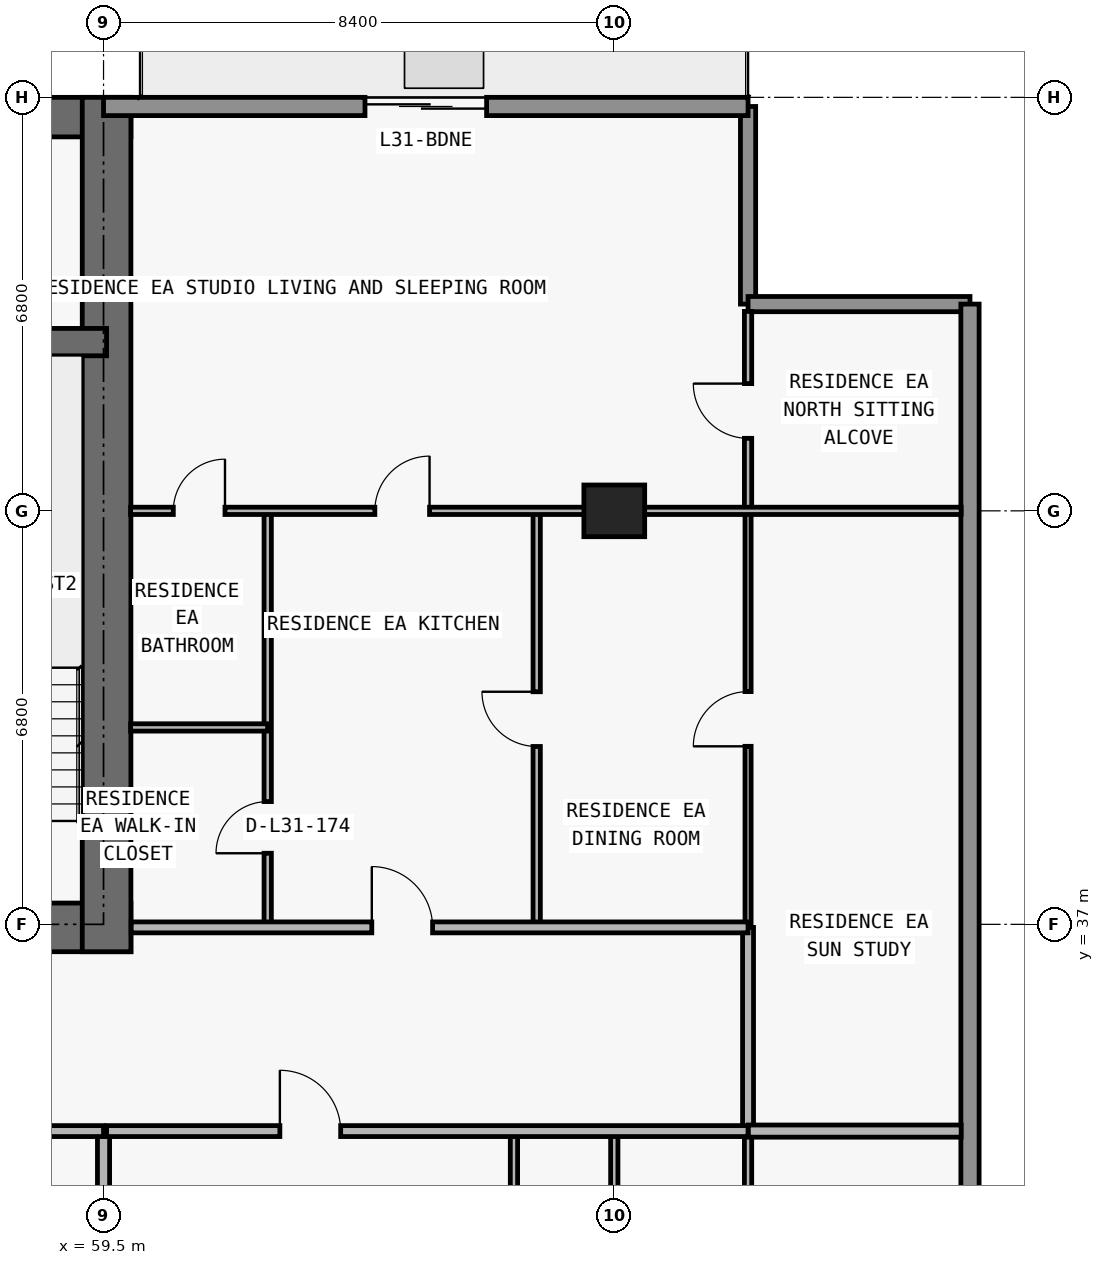
"""IFC4 building model, lengths in metres.
Left out: names, types, materials, properties, quantities, classifications, styles, units other than length and angle.
Written with IfcOpenShell. Run it as: python <this file> out.ifc"""

import sys

from ifc_helpers import new_model, si_unit, direction, frame, frame_2d, origin, origin_2d, place, context, subcontext, project, spatial, rectangle, extrude, element, fill, save


model = new_model("IFC4")
c1 = context("Model", 3, precision=1e-05, world=origin(), true_north=direction((0.0, 1.0)))
c2 = subcontext(c1, "Body", "Model", "MODEL_VIEW")
j1 = project(units=[si_unit("LENGTHUNIT", "METRE"), si_unit("PLANEANGLEUNIT", "RADIAN")], contexts=[c1])
p1 = place(None, origin())
s1 = spatial("IfcSite", under=j1, at=p1, CompositionType="ELEMENT")
p2 = place(p1, origin())
s2 = spatial("IfcBuilding", under=s1, at=p2, CompositionType="ELEMENT")
p3 = place(p2, frame((0.0, 0.0, 115.8)))
s3 = spatial("IfcBuildingStorey", under=s2, at=p3, CompositionType="ELEMENT", Elevation=115.8)
p4 = place(p3, frame((67.9, 43.8, 0.0), z_axis=(0.0, 0.0, 1.0), x_axis=(1.0, 0.0, 0.0)))
e1 = element("IfcColumn", 1, at=p4, inside=s3, PredefinedType="COLUMN", context=c2, shape_type="SweptSolid", body=[
    extrude(rectangle(XDim=1.0, YDim=0.85, at=origin_2d()), origin(), (0.0, 0.0, 1.0), 3.05),
])
p5 = place(p3, frame((17.85, 36.95, 0.0), z_axis=(0.0, 0.0, 1.0), x_axis=(1.0, 0.0, 0.0)))
e2 = element("IfcWall", 2, at=p5, inside=s3, PredefinedType="SHEAR", context=c2, shape_type="SweptSolid", body=[
    extrude(rectangle(XDim=42.1, YDim=0.8, at=frame_2d((21.05, 0.0))), origin(), (0.0, 0.0, 1.0), 3.05),
])
p6 = place(p5, frame((14.45, 0.0, 0.0)))
e3 = element("IfcOpeningElement", 3, at=p6, cuts=e2, PredefinedType="OPENING", context=c2, shape_type="SweptSolid", body=[
    extrude(rectangle(XDim=1.1, YDim=2.15, at=frame_2d((0.55, 1.075))), frame((0.0, 0.41, 0.0), z_axis=(0.0, -1.0, 0.0), x_axis=(1.0, 0.0, 0.0)), (0.0, 0.0, 1.0), 0.82),
])
p7 = place(p5, frame((6.3, 0.0, 0.0)))
e4 = element("IfcOpeningElement", 4, at=p7, cuts=e2, PredefinedType="OPENING", context=c2, shape_type="SweptSolid", body=[
    extrude(rectangle(XDim=1.05, YDim=2.15, at=frame_2d((0.525, 1.075))), frame((0.0, 0.41, 0.0), z_axis=(0.0, -1.0, 0.0), x_axis=(1.0, 0.0, 0.0)), (0.0, 0.0, 1.0), 0.82),
])
p8 = place(p5, frame((34.8, 0.0, 0.0)))
e5 = element("IfcOpeningElement", 5, at=p8, cuts=e2, PredefinedType="OPENING", context=c2, shape_type="SweptSolid", body=[
    extrude(rectangle(XDim=1.05, YDim=2.15, at=frame_2d((0.525, 1.075))), frame((0.0, 0.41, 0.0), z_axis=(0.0, -1.0, 0.0), x_axis=(1.0, 0.0, 0.0)), (0.0, 0.0, 1.0), 0.82),
])
p9 = place(p5, frame((10.913, 0.0, 0.0)))
e6 = element("IfcOpeningElement", 6, at=p9, cuts=e2, PredefinedType="OPENING", context=c2, shape_type="SweptSolid", body=[
    extrude(rectangle(XDim=1.05, YDim=2.15, at=frame_2d((0.525, 1.075))), frame((0.0, 0.41, 0.0), z_axis=(0.0, -1.0, 0.0), x_axis=(1.0, 0.0, 0.0)), (0.0, 0.0, 1.0), 0.82),
])
p10 = place(p5, frame((24.15, 0.0, 0.0)))
e7 = element("IfcOpeningElement", 7, at=p10, cuts=e2, PredefinedType="OPENING", context=c2, shape_type="SweptSolid", body=[
    extrude(rectangle(XDim=1.05, YDim=2.15, at=frame_2d((0.525, 1.075))), frame((0.0, 0.41, 0.0), z_axis=(0.0, -1.0, 0.0), x_axis=(1.0, 0.0, 0.0)), (0.0, 0.0, 1.0), 0.82),
])
p11 = place(p3, frame((17.85, 50.275, 0.0), z_axis=(0.0, 0.0, 1.0), x_axis=(1.0, 0.0, 0.0)))
e8 = element("IfcWall", 8, at=p11, inside=s3, PredefinedType="SHEAR", context=c2, shape_type="SweptSolid", body=[
    extrude(rectangle(XDim=42.1, YDim=0.65, at=frame_2d((21.05, 0.0))), origin(), (0.0, 0.0, 1.0), 3.05),
])
p12 = place(p3, frame((59.55, 36.55, 0.0), z_axis=(0.0, 0.0, 1.0), x_axis=(0.0, 1.0, 0.0)))
e9 = element("IfcWall", 9, at=p12, inside=s3, PredefinedType="SHEAR", context=c2, shape_type="SweptSolid", body=[
    extrude(rectangle(XDim=14.05, YDim=0.8, at=frame_2d((7.025, 0.0))), origin(), (0.0, 0.0, 1.0), 3.05),
])
p13 = place(p3, frame((18.25, 46.575, 0.0), z_axis=(0.0, 0.0, 1.0), x_axis=(1.0, 0.0, 0.0)))
e10 = element("IfcWall", 10, at=p13, inside=s3, PredefinedType="SHEAR", context=c2, shape_type="SweptSolid", body=[
    extrude(rectangle(XDim=41.3, YDim=0.45, at=frame_2d((20.65, 0.0))), origin(), (0.0, 0.0, 1.0), 3.05),
])
p14 = place(p13, frame((7.625, 0.0, 0.0)))
e11 = element("IfcOpeningElement", 11, at=p14, cuts=e10, PredefinedType="OPENING", context=c2, shape_type="SweptSolid", body=[
    extrude(rectangle(XDim=1.05, YDim=2.15, at=frame_2d((0.525, 1.075))), frame((0.0, 0.235, 0.0), z_axis=(0.0, -1.0, 0.0), x_axis=(1.0, 0.0, 0.0)), (0.0, 0.0, 1.0), 0.47),
])
p15 = place(p13, frame((32.675, 0.0, 0.0)))
e12 = element("IfcOpeningElement", 12, at=p15, cuts=e10, PredefinedType="OPENING", context=c2, shape_type="SweptSolid", body=[
    extrude(rectangle(XDim=1.05, YDim=2.15, at=frame_2d((0.525, 1.075))), frame((0.0, 0.235, 0.0), z_axis=(0.0, -1.0, 0.0), x_axis=(1.0, 0.0, 0.0)), (0.0, 0.0, 1.0), 0.47),
])
p16 = place(p3, frame((70.1, 50.45, 0.0), z_axis=(0.0, 0.0, 1.0), x_axis=(0.0, -1.0, 0.0)))
e13 = element("IfcWall", 13, at=p16, inside=s3, PredefinedType="ELEMENTEDWALL", context=c2, shape_type="SweptSolid", body=[
    extrude(rectangle(XDim=3.25, YDim=0.25, at=frame_2d((1.625, 0.0))), origin(), (0.0, 0.0, 1.0), 3.05),
])
p17 = place(p3, frame((70.1, 47.2, 0.0), z_axis=(0.0, 0.0, 1.0), x_axis=(1.0, 0.0, 0.0)))
e14 = element("IfcWall", 14, at=p17, inside=s3, PredefinedType="ELEMENTEDWALL", context=c2, shape_type="SweptSolid", body=[
    extrude(rectangle(XDim=3.65, YDim=0.25, at=frame_2d((1.825, 0.0))), origin(), (0.0, 0.0, 1.0), 3.05),
])
p18 = place(p3, frame((73.75, 47.2, 0.0), z_axis=(0.0, 0.0, 1.0), x_axis=(0.0, -1.0, 0.0)))
e15 = element("IfcWall", 15, at=p18, inside=s3, PredefinedType="STANDARD", context=c2, shape_type="SweptSolid", body=[
    extrude(rectangle(XDim=19.2, YDim=0.3, at=frame_2d((9.6, 0.0))), origin(), (0.0, 0.0, 1.0), 3.05),
])
p19 = place(p3, frame((59.5, 50.45, 0.0), z_axis=(0.0, 0.0, 1.0), x_axis=(1.0, 0.0, 0.0)))
e16 = element("IfcWall", 16, at=p19, inside=s3, PredefinedType="STANDARD", context=c2, shape_type="SweptSolid", body=[
    extrude(rectangle(XDim=10.6, YDim=0.3, at=frame_2d((5.3, 0.0))), origin(), (0.0, 0.0, 1.0), 3.05),
])
p20 = place(p19, frame((4.3, 0.0, 0.0)))
e17 = element("IfcOpeningElement", 17, at=p20, cuts=e16, PredefinedType="OPENING", context=c2, shape_type="SweptSolid", body=[
    extrude(rectangle(XDim=2.0, YDim=2.3, at=frame_2d((1.0, 1.15))), frame((0.0, 0.16, 0.0), z_axis=(0.0, -1.0, 0.0), x_axis=(1.0, 0.0, 0.0)), (0.0, 0.0, 1.0), 0.32),
])
p21 = place(p3, frame((59.5, 27.08, 0.0), z_axis=(0.0, 0.0, 1.0), x_axis=(0.0, 1.0, 0.0)))
e18 = element("IfcWall", 18, at=p21, inside=s3, PredefinedType="PARTITIONING", context=c2, shape_type="SweptSolid", body=[
    extrude(rectangle(XDim=6.52, YDim=0.2, at=frame_2d((3.26, 0.0))), origin(), (0.0, 0.0, 1.0), 2.174),
])
p22 = place(p3, frame((62.2, 36.95, 0.0), z_axis=(0.0, 0.0, 1.0), x_axis=(0.0, 1.0, 0.0)))
e19 = element("IfcWall", 19, at=p22, inside=s3, PredefinedType="PARTITIONING", context=c2, shape_type="SweptSolid", body=[
    extrude(rectangle(XDim=6.85, YDim=0.12, at=frame_2d((3.425, 0.0))), origin(), (0.0, 0.0, 1.0), 3.05),
])
p23 = place(p22, frame((1.219, 0.0, 0.0)))
e20 = element("IfcOpeningElement", 20, at=p23, cuts=e19, PredefinedType="OPENING", context=c2, shape_type="SweptSolid", body=[
    extrude(rectangle(XDim=0.85, YDim=2.1, at=frame_2d((0.425, 1.05))), frame((0.0, 0.07, 0.0), z_axis=(0.0, -1.0, 0.0), x_axis=(1.0, 0.0, 0.0)), (0.0, 0.0, 1.0), 0.14),
])
p24 = place(p3, frame((66.25, 27.08, 0.0), z_axis=(0.0, 0.0, 1.0), x_axis=(0.0, 1.0, 0.0)))
e21 = element("IfcWall", 21, at=p24, inside=s3, PredefinedType="PARTITIONING", context=c2, shape_type="SweptSolid", body=[
    extrude(rectangle(XDim=6.52, YDim=0.12, at=frame_2d((3.26, 0.0))), origin(), (0.0, 0.0, 1.0), 3.05),
])
p25 = place(p24, frame((3.285, 0.0, 0.0)))
e22 = element("IfcOpeningElement", 22, at=p25, cuts=e21, PredefinedType="OPENING", context=c2, shape_type="SweptSolid", body=[
    extrude(rectangle(XDim=0.85, YDim=2.1, at=frame_2d((0.425, 1.05))), frame((0.0, 0.07, 0.0), z_axis=(0.0, -1.0, 0.0), x_axis=(1.0, 0.0, 0.0)), (0.0, 0.0, 1.0), 0.14),
])
p26 = place(p3, frame((66.624, 36.95, 0.0), z_axis=(0.0, 0.0, 1.0), x_axis=(0.0, 1.0, 0.0)))
e23 = element("IfcWall", 23, at=p26, inside=s3, PredefinedType="PARTITIONING", context=c2, shape_type="SweptSolid", body=[
    extrude(rectangle(XDim=6.85, YDim=0.12, at=frame_2d((3.425, 0.0))), origin(), (0.0, 0.0, 1.0), 3.05),
])
p27 = place(p26, frame((2.975, 0.0, 0.0)))
e24 = element("IfcOpeningElement", 24, at=p27, cuts=e23, PredefinedType="OPENING", context=c2, shape_type="SweptSolid", body=[
    extrude(rectangle(XDim=0.9, YDim=2.15, at=frame_2d((0.45, 1.075))), frame((0.0, 0.07, 0.0), z_axis=(0.0, -1.0, 0.0), x_axis=(1.0, 0.0, 0.0)), (0.0, 0.0, 1.0), 0.14),
])
p28 = place(p3, frame((67.9, 27.08, 0.0), z_axis=(0.0, 0.0, 1.0), x_axis=(0.0, 1.0, 0.0)))
e25 = element("IfcWall", 25, at=p28, inside=s3, PredefinedType="PARTITIONING", context=c2, shape_type="SweptSolid", body=[
    extrude(rectangle(XDim=6.52, YDim=0.12, at=frame_2d((3.26, 0.0))), origin(), (0.0, 0.0, 1.0), 2.174),
])
p29 = place(p3, frame((70.1, 27.08, 0.0), z_axis=(0.0, 0.0, 1.0), x_axis=(0.0, 1.0, 0.0)))
e26 = element("IfcWall", 26, at=p29, inside=s3, PredefinedType="PARTITIONING", context=c2, shape_type="SweptSolid", body=[
    extrude(rectangle(XDim=6.52, YDim=0.12, at=frame_2d((3.26, 0.0))), origin(), (0.0, 0.0, 1.0), 3.05),
])
p30 = place(p3, frame((70.1, 33.605, 0.0), z_axis=(0.0, 0.0, 1.0), x_axis=(0.0, 1.0, 0.0)))
e27 = element("IfcWall", 27, at=p30, inside=s3, PredefinedType="PARTITIONING", context=c2, shape_type="SweptSolid", body=[
    extrude(rectangle(XDim=3.345, YDim=0.18, at=frame_2d((1.672, 0.0))), origin(), (0.0, 0.0, 1.0), 3.05),
])
p31 = place(p3, frame((70.1, 36.955, 0.0), z_axis=(0.0, 0.0, 1.0), x_axis=(0.0, 1.0, 0.0)))
e28 = element("IfcWall", 28, at=p31, inside=s3, PredefinedType="MOVABLE", context=c2, shape_type="SweptSolid", body=[
    extrude(rectangle(XDim=6.845, YDim=0.1, at=frame_2d((3.422, 0.0))), origin(), (0.0, 0.0, 1.0), 3.05),
])
p32 = place(p31, frame((2.972, 0.0, 0.0)))
e29 = element("IfcOpeningElement", 29, at=p32, cuts=e28, PredefinedType="OPENING", context=c2, shape_type="SweptSolid", body=[
    extrude(rectangle(XDim=0.9, YDim=2.15, at=frame_2d((0.45, 1.075))), frame((0.0, 0.06, 0.0), z_axis=(0.0, -1.0, 0.0), x_axis=(1.0, 0.0, 0.0)), (0.0, 0.0, 1.0), 0.12),
])
p33 = place(p3, frame((70.1, 43.805, 0.0), z_axis=(0.0, 0.0, 1.0), x_axis=(0.0, 1.0, 0.0)))
e30 = element("IfcWall", 30, at=p33, inside=s3, PredefinedType="PARTITIONING", context=c2, shape_type="SweptSolid", body=[
    extrude(rectangle(XDim=3.275, YDim=0.12, at=frame_2d((1.638, 0.0))), origin(), (0.0, 0.0, 1.0), 3.05),
])
p34 = place(p33, frame((1.188, 0.0, 0.0)))
e31 = element("IfcOpeningElement", 31, at=p34, cuts=e30, PredefinedType="OPENING", context=c2, shape_type="SweptSolid", body=[
    extrude(rectangle(XDim=0.9, YDim=2.15, at=frame_2d((0.45, 1.075))), frame((0.0, 0.07, 0.0), z_axis=(0.0, -1.0, 0.0), x_axis=(1.0, 0.0, 0.0)), (0.0, 0.0, 1.0), 0.14),
])
p35 = place(p3, frame((18.3, 33.6, 0.0), z_axis=(0.0, 0.0, 1.0), x_axis=(1.0, 0.0, 0.0)))
e32 = element("IfcWall", 32, at=p35, inside=s3, PredefinedType="PARTITIONING", context=c2, shape_type="SweptSolid", body=[
    extrude(rectangle(XDim=41.2, YDim=0.18, at=frame_2d((20.6, 0.0))), origin(), (0.0, 0.0, 1.0), 3.05),
])
p36 = place(p35, frame((11.35, 0.0, 0.0)))
e33 = element("IfcOpeningElement", 33, at=p36, cuts=e32, PredefinedType="OPENING", context=c2, shape_type="SweptSolid", body=[
    extrude(rectangle(XDim=1.0, YDim=2.2, at=frame_2d((0.5, 1.1))), frame((0.0, 0.1, 0.0), z_axis=(0.0, -1.0, 0.0), x_axis=(1.0, 0.0, 0.0)), (0.0, 0.0, 1.0), 0.2),
])
p37 = place(p35, frame((27.275, 0.0, 0.0)))
e34 = element("IfcOpeningElement", 34, at=p37, cuts=e32, PredefinedType="OPENING", context=c2, shape_type="SweptSolid", body=[
    extrude(rectangle(XDim=1.0, YDim=2.2, at=frame_2d((0.5, 1.1))), frame((0.0, 0.1, 0.0), z_axis=(0.0, -1.0, 0.0), x_axis=(1.0, 0.0, 0.0)), (0.0, 0.0, 1.0), 0.2),
])
p38 = place(p35, frame((35.675, 0.0, 0.0)))
e35 = element("IfcOpeningElement", 35, at=p38, cuts=e32, PredefinedType="OPENING", context=c2, shape_type="SweptSolid", body=[
    extrude(rectangle(XDim=1.0, YDim=2.2, at=frame_2d((0.5, 1.1))), frame((0.0, 0.1, 0.0), z_axis=(0.0, -1.0, 0.0), x_axis=(1.0, 0.0, 0.0)), (0.0, 0.0, 1.0), 0.2),
])
p39 = place(p3, frame((59.55, 33.6, 0.0), z_axis=(0.0, 0.0, 1.0), x_axis=(1.0, 0.0, 0.0)))
e36 = element("IfcWall", 36, at=p39, inside=s3, PredefinedType="PARTITIONING", context=c2, shape_type="SweptSolid", body=[
    extrude(rectangle(XDim=10.55, YDim=0.18, at=frame_2d((5.275, 0.0))), origin(), (0.0, 0.0, 1.0), 3.05),
])
p40 = place(p39, frame((2.85, 0.0, 0.0)))
e37 = element("IfcOpeningElement", 37, at=p40, cuts=e36, PredefinedType="OPENING", context=c2, shape_type="SweptSolid", body=[
    extrude(rectangle(XDim=1.0, YDim=2.2, at=frame_2d((0.5, 1.1))), frame((0.0, 0.1, 0.0), z_axis=(0.0, -1.0, 0.0), x_axis=(1.0, 0.0, 0.0)), (0.0, 0.0, 1.0), 0.2),
])
p41 = place(p3, frame((70.105, 33.6, 0.0), z_axis=(0.0, 0.0, 1.0), x_axis=(1.0, 0.0, 0.0)))
e38 = element("IfcWall", 38, at=p41, inside=s3, PredefinedType="PARTITIONING", context=c2, shape_type="SweptSolid", body=[
    extrude(rectangle(XDim=3.5, YDim=0.2, at=frame_2d((1.75, 0.0))), origin(), (0.0, 0.0, 1.0), 3.05),
])
p42 = place(p3, frame((59.955, 36.95, 0.0), z_axis=(0.0, 0.0, 1.0), x_axis=(1.0, 0.0, 0.0)))
e39 = element("IfcWall", 39, at=p42, inside=s3, PredefinedType="PARTITIONING", context=c2, shape_type="SweptSolid", body=[
    extrude(rectangle(XDim=10.145, YDim=0.18, at=frame_2d((5.073, 0.0))), origin(), (0.0, 0.0, 1.0), 3.05),
])
p43 = place(p42, frame((3.957, 0.0, 0.0)))
e40 = element("IfcOpeningElement", 40, at=p43, cuts=e39, PredefinedType="OPENING", context=c2, shape_type="SweptSolid", body=[
    extrude(rectangle(XDim=1.0, YDim=2.2, at=frame_2d((0.5, 1.1))), frame((0.0, 0.1, 0.0), z_axis=(0.0, -1.0, 0.0), x_axis=(1.0, 0.0, 0.0)), (0.0, 0.0, 1.0), 0.2),
])
p44 = place(p3, frame((59.945, 40.238, 0.0), z_axis=(0.0, 0.0, 1.0), x_axis=(1.0, 0.0, 0.0)))
e41 = element("IfcWall", 41, at=p44, inside=s3, PredefinedType="PARTITIONING", context=c2, shape_type="SweptSolid", body=[
    extrude(rectangle(XDim=2.255, YDim=0.12, at=frame_2d((1.127, 0.0))), origin(), (0.0, 0.0, 1.0), 3.05),
])
p45 = place(p3, frame((59.945, 43.8, 0.0), z_axis=(0.0, 0.0, 1.0), x_axis=(1.0, 0.0, 0.0)))
e42 = element("IfcWall", 42, at=p45, inside=s3, PredefinedType="PARTITIONING", context=c2, shape_type="SweptSolid", body=[
    extrude(rectangle(XDim=13.66, YDim=0.12, at=frame_2d((6.83, 0.0))), origin(), (0.0, 0.0, 1.0), 2.339),
])
p46 = place(p45, frame((4.017, 0.0, 0.0)))
e43 = element("IfcOpeningElement", 43, at=p46, cuts=e42, PredefinedType="OPENING", context=c2, shape_type="SweptSolid", body=[
    extrude(rectangle(XDim=0.9, YDim=2.15, at=frame_2d((0.45, 1.075))), frame((0.0, 0.07, 0.0), z_axis=(0.0, -1.0, 0.0), x_axis=(1.0, 0.0, 0.0)), (0.0, 0.0, 1.0), 0.14),
])
p47 = place(p45, frame((0.702, 0.0, 0.0)))
e44 = element("IfcOpeningElement", 44, at=p47, cuts=e42, PredefinedType="OPENING", context=c2, shape_type="SweptSolid", body=[
    extrude(rectangle(XDim=0.85, YDim=2.1, at=frame_2d((0.425, 1.05))), frame((0.0, 0.07, 0.0), z_axis=(0.0, -1.0, 0.0), x_axis=(1.0, 0.0, 0.0)), (0.0, 0.0, 1.0), 0.14),
])
p48 = place(p20, origin())
e45 = element("IfcDoor", 45, at=p48, inside=s3, OperationType="DOUBLE_DOOR_SLIDING", PredefinedType="DOOR", context=c2, shape_type="SweptSolid", body=[
    extrude(rectangle(XDim=2.0, YDim=2.3, at=frame_2d((1.0, 1.15))), frame((0.0, 0.025, 0.0), z_axis=(0.0, -1.0, 0.0), x_axis=(1.0, 0.0, 0.0)), (0.0, 0.0, 1.0), 0.05),
])
fill(e17, e45)
p49 = place(p40, origin())
e46 = element("IfcDoor", 46, at=p49, inside=s3, OperationType="SINGLE_SWING_LEFT", PredefinedType="DOOR", context=c2, shape_type="SweptSolid", body=[
    extrude(rectangle(XDim=1.0, YDim=2.2, at=frame_2d((0.5, 1.1))), frame((0.0, 0.025, 0.0), z_axis=(0.0, -1.0, 0.0), x_axis=(1.0, 0.0, 0.0)), (0.0, 0.0, 1.0), 0.05),
])
fill(e37, e46)
p50 = place(p27, origin())
e47 = element("IfcDoor", 47, at=p50, inside=s3, OperationType="SINGLE_SWING_RIGHT", PredefinedType="DOOR", context=c2, shape_type="SweptSolid", body=[
    extrude(rectangle(XDim=0.9, YDim=2.15, at=frame_2d((0.45, 1.075))), frame((0.0, 0.025, 0.0), z_axis=(0.0, -1.0, 0.0), x_axis=(1.0, 0.0, 0.0)), (0.0, 0.0, 1.0), 0.05),
])
fill(e24, e47)
p51 = place(p43, origin())
e48 = element("IfcDoor", 48, at=p51, inside=s3, OperationType="SINGLE_SWING_LEFT", PredefinedType="DOOR", context=c2, shape_type="SweptSolid", body=[
    extrude(rectangle(XDim=1.0, YDim=2.2, at=frame_2d((0.5, 1.1))), frame((0.0, 0.025, 0.0), z_axis=(0.0, -1.0, 0.0), x_axis=(1.0, 0.0, 0.0)), (0.0, 0.0, 1.0), 0.05),
])
fill(e40, e48)
p52 = place(p46, origin())
e49 = element("IfcDoor", 49, at=p52, inside=s3, OperationType="SINGLE_SWING_RIGHT", PredefinedType="DOOR", context=c2, shape_type="SweptSolid", body=[
    extrude(rectangle(XDim=0.9, YDim=2.15, at=frame_2d((0.45, 1.075))), frame((0.0, 0.025, 0.0), z_axis=(0.0, -1.0, 0.0), x_axis=(1.0, 0.0, 0.0)), (0.0, 0.0, 1.0), 0.05),
])
fill(e43, e49)
p53 = place(p23, origin())
e50 = element("IfcDoor", 50, at=p53, inside=s3, OperationType="SINGLE_SWING_LEFT", PredefinedType="DOOR", context=c2, shape_type="SweptSolid", body=[
    extrude(rectangle(XDim=0.85, YDim=2.1, at=frame_2d((0.425, 1.05))), frame((0.0, 0.025, 0.0), z_axis=(0.0, -1.0, 0.0), x_axis=(1.0, 0.0, 0.0)), (0.0, 0.0, 1.0), 0.05),
])
fill(e20, e50)
p54 = place(p47, origin())
e51 = element("IfcDoor", 51, at=p54, inside=s3, OperationType="SINGLE_SWING_RIGHT", PredefinedType="DOOR", context=c2, shape_type="SweptSolid", body=[
    extrude(rectangle(XDim=0.85, YDim=2.1, at=frame_2d((0.425, 1.05))), frame((0.0, 0.025, 0.0), z_axis=(0.0, -1.0, 0.0), x_axis=(1.0, 0.0, 0.0)), (0.0, 0.0, 1.0), 0.05),
])
fill(e44, e51)
p55 = place(p32, origin())
e52 = element("IfcDoor", 52, at=p55, inside=s3, OperationType="SINGLE_SWING_LEFT", PredefinedType="DOOR", context=c2, shape_type="SweptSolid", body=[
    extrude(rectangle(XDim=0.9, YDim=2.15, at=frame_2d((0.45, 1.075))), frame((0.0, 0.025, 0.0), z_axis=(0.0, -1.0, 0.0), x_axis=(1.0, 0.0, 0.0)), (0.0, 0.0, 1.0), 0.05),
])
fill(e29, e52)
p56 = place(p34, origin())
e53 = element("IfcDoor", 53, at=p56, inside=s3, OperationType="SINGLE_SWING_RIGHT", PredefinedType="DOOR", context=c2, shape_type="SweptSolid", body=[
    extrude(rectangle(XDim=0.9, YDim=2.15, at=frame_2d((0.45, 1.075))), frame((0.0, 0.025, 0.0), z_axis=(0.0, -1.0, 0.0), x_axis=(1.0, 0.0, 0.0)), (0.0, 0.0, 1.0), 0.05),
])
fill(e31, e53)
save(model, sys.argv[1])
